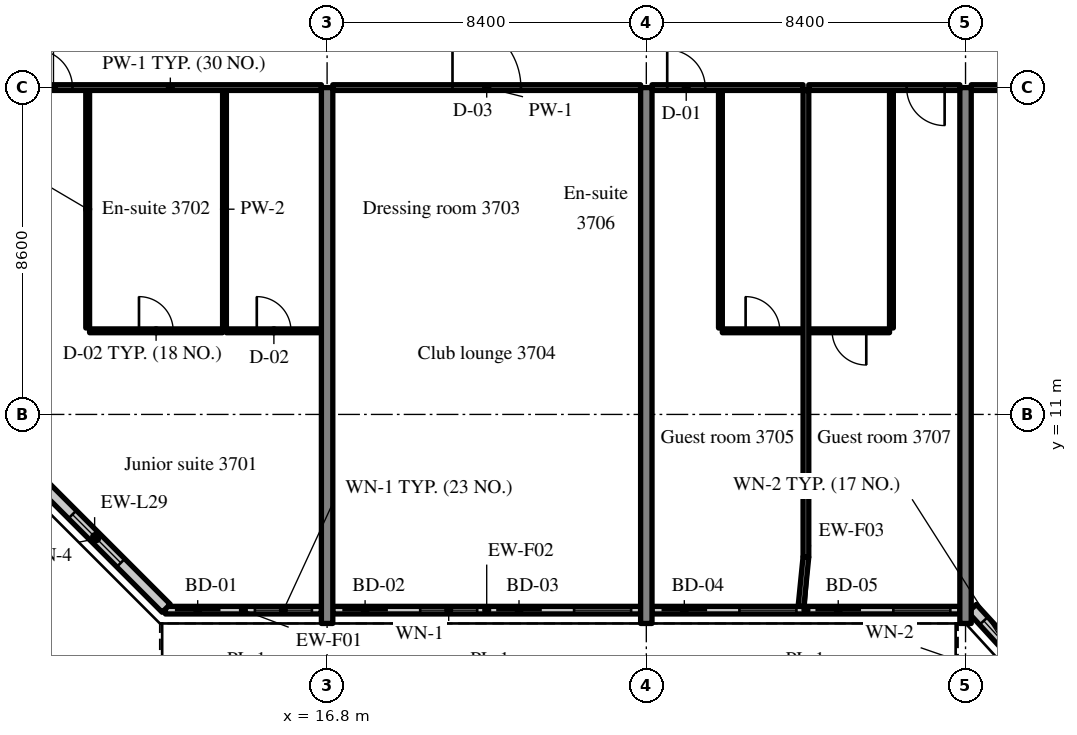
"""IFC4 building model, lengths in metres.
Left out: names, types, materials, properties, quantities, classifications, styles, units other than length and angle.
Written with IfcOpenShell. Run it as: python <this file> out.ifc"""

import sys

from ifc_helpers import new_model, si_unit, direction, frame, frame_2d, origin, place, context, subcontext, project, spatial, rectangle, extrude, source, transform, mapped, element, fill, save


model = new_model("IFC4")
c1 = context("Model", 3, precision=1e-05, world=origin(), true_north=direction((0.0, 1.0)))
c2 = subcontext(c1, "Body", "Model", "MODEL_VIEW")
j1 = project(units=[si_unit("LENGTHUNIT", "METRE"), si_unit("PLANEANGLEUNIT", "RADIAN")], contexts=[c1])
p1 = place(None, origin())
s1 = spatial("IfcSite", under=j1, at=p1, CompositionType="ELEMENT")
p2 = place(p1, origin())
s2 = spatial("IfcBuilding", under=s1, at=p2, CompositionType="ELEMENT")
p3 = place(p2, frame((0.0, 0.0, 155.4)))
s3 = spatial("IfcBuildingStorey", under=s2, at=p3, CompositionType="ELEMENT", Elevation=155.4)
m1 = source(origin(), c2, "Body", "SweptSolid", [
    extrude(rectangle(XDim=14.1, YDim=0.3, at=frame_2d((7.05, 0.0))), origin(), (0.0, 0.0, 1.0), 3.52),
])
for number, where, z_axis, x_axis in (
    (1, (16.8, 5.5, 0.0), (0.0, 0.0, 1.0), (0.0, 1.0, 0.0)),
    (2, (25.2, 5.5, 0.0), (0.0, 0.0, 1.0), (0.0, 1.0, 0.0)),
    (3, (33.6, 5.5, 0.0), (0.0, 0.0, 1.0), (0.0, 1.0, 0.0)),
):
    element("IfcWall", number, at=place(p3, frame(where, z_axis=z_axis, x_axis=x_axis)), inside=s3, PredefinedType="SHEAR", context=c2, shape_type="MappedRepresentation", body=[
        mapped(m1, transform((0.0, 0.0, 0.0), scale=1.0)),
    ])
m2 = source(origin(), c2, "Body", "SweptSolid", [
    extrude(rectangle(XDim=4.105, YDim=0.2, at=frame_2d((2.052, 0.0))), origin(), (0.0, 0.0, 1.0), 2.87),
])
p4 = place(p3, frame((12.545, 5.85, 0.0), z_axis=(0.0, 0.0, 1.0), x_axis=(1.0, 0.0, 0.0)))
e4 = element("IfcWall", 4, at=p4, inside=s3, PredefinedType="SOLIDWALL", context=c2, shape_type="MappedRepresentation", body=[
    mapped(m2, transform((0.0, 0.0, 0.0), scale=1.0)),
])
m3 = source(origin(), c2, "Body", "SweptSolid", [
    extrude(rectangle(XDim=1.2, YDim=2.4, at=frame_2d((0.6, 1.2))), frame((0.0, 0.11, 0.0), z_axis=(0.0, -1.0, 0.0), x_axis=(1.0, 0.0, 0.0)), (0.0, 0.0, 1.0), 0.22),
])
p5 = place(p4, frame((0.25, 0.0, 0.0)))
e5 = element("IfcOpeningElement", 5, at=p5, cuts=e4, PredefinedType="OPENING", context=c2, shape_type="MappedRepresentation", body=[
    mapped(m3, transform((0.0, 0.0, 0.0), scale=1.0)),
])
m4 = source(origin(), c2, "Body", "SweptSolid", [
    extrude(rectangle(XDim=1.5, YDim=1.5, at=frame_2d((0.75, 0.75))), frame((0.0, 0.11, 0.0), z_axis=(0.0, -1.0, 0.0), x_axis=(1.0, 0.0, 0.0)), (0.0, 0.0, 1.0), 0.22),
])
p6 = place(p4, frame((2.355, 0.0, 0.9)))
e6 = element("IfcOpeningElement", 6, at=p6, cuts=e4, PredefinedType="OPENING", context=c2, shape_type="MappedRepresentation", body=[
    mapped(m4, transform((0.0, 0.0, 0.0), scale=1.0)),
])
m5 = source(origin(), c2, "Body", "SweptSolid", [
    extrude(rectangle(XDim=8.1, YDim=0.2, at=frame_2d((4.05, 0.0))), origin(), (0.0, 0.0, 1.0), 2.87),
])
p7 = place(p3, frame((16.95, 5.85, 0.0), z_axis=(0.0, 0.0, 1.0), x_axis=(1.0, 0.0, 0.0)))
e7 = element("IfcWall", 7, at=p7, inside=s3, PredefinedType="SOLIDWALL", context=c2, shape_type="MappedRepresentation", body=[
    mapped(m5, transform((0.0, 0.0, 0.0), scale=1.0)),
])
p8 = place(p7, frame((0.25, 0.0, 0.0)))
e8 = element("IfcOpeningElement", 8, at=p8, cuts=e7, PredefinedType="OPENING", context=c2, shape_type="MappedRepresentation", body=[
    mapped(m3, transform((0.0, 0.0, 0.0), scale=1.0)),
])
p9 = place(p7, frame((2.3, 0.0, 0.9)))
e9 = element("IfcOpeningElement", 9, at=p9, cuts=e7, PredefinedType="OPENING", context=c2, shape_type="MappedRepresentation", body=[
    mapped(m4, transform((0.0, 0.0, 0.0), scale=1.0)),
])
p10 = place(p7, frame((4.3, 0.0, 0.0)))
e10 = element("IfcOpeningElement", 10, at=p10, cuts=e7, PredefinedType="OPENING", context=c2, shape_type="MappedRepresentation", body=[
    mapped(m3, transform((0.0, 0.0, 0.0), scale=1.0)),
])
p11 = place(p7, frame((6.35, 0.0, 0.9)))
e11 = element("IfcOpeningElement", 11, at=p11, cuts=e7, PredefinedType="OPENING", context=c2, shape_type="MappedRepresentation", body=[
    mapped(m4, transform((0.0, 0.0, 0.0), scale=1.0)),
])
m6 = source(origin(), c2, "Body", "SweptSolid", [
    extrude(rectangle(XDim=8.1, YDim=0.2, at=frame_2d((4.05, 0.0))), origin(), (0.0, 0.0, 1.0), 2.87),
])
p12 = place(p3, frame((25.35, 5.85, 0.0), z_axis=(0.0, 0.0, 1.0), x_axis=(1.0, 0.0, 0.0)))
e12 = element("IfcWall", 12, at=p12, inside=s3, PredefinedType="SOLIDWALL", context=c2, shape_type="MappedRepresentation", body=[
    mapped(m6, transform((0.0, 0.0, 0.0), scale=1.0)),
])
p13 = place(p12, frame((0.25, 0.0, 0.0)))
e13 = element("IfcOpeningElement", 13, at=p13, cuts=e12, PredefinedType="OPENING", context=c2, shape_type="MappedRepresentation", body=[
    mapped(m3, transform((0.0, 0.0, 0.0), scale=1.0)),
])
p14 = place(p12, frame((2.3, 0.0, 0.9)))
e14 = element("IfcOpeningElement", 14, at=p14, cuts=e12, PredefinedType="OPENING", context=c2, shape_type="MappedRepresentation", body=[
    mapped(m4, transform((0.0, 0.0, 0.0), scale=1.0)),
])
p15 = place(p12, frame((4.3, 0.0, 0.0)))
e15 = element("IfcOpeningElement", 15, at=p15, cuts=e12, PredefinedType="OPENING", context=c2, shape_type="MappedRepresentation", body=[
    mapped(m3, transform((0.0, 0.0, 0.0), scale=1.0)),
])
p16 = place(p12, frame((6.35, 0.0, 0.9)))
e16 = element("IfcOpeningElement", 16, at=p16, cuts=e12, PredefinedType="OPENING", context=c2, shape_type="MappedRepresentation", body=[
    mapped(m4, transform((0.0, 0.0, 0.0), scale=1.0)),
])
m7 = source(origin(), c2, "Body", "SweptSolid", [
    extrude(rectangle(XDim=2.398, YDim=0.3, at=frame_2d((1.199, 0.0))), origin(), (0.0, 0.0, 1.0), 3.52),
])
p17 = place(p3, frame((33.776, 5.9, 0.0), z_axis=(0.0, 0.0, 1.0), x_axis=(0.675374189419, -0.737475222815, 0.0)))
e17 = element("IfcWall", 17, at=p17, inside=s3, PredefinedType="SOLIDWALL", context=c2, shape_type="MappedRepresentation", body=[
    mapped(m7, transform((0.0, 0.0, 0.0), scale=1.0)),
])
m8 = source(origin(), c2, "Body", "SweptSolid", [
    extrude(rectangle(XDim=1.5, YDim=2.0, at=frame_2d((0.75, 1.0))), frame((0.0, 0.16, 0.0), z_axis=(0.0, -1.0, 0.0), x_axis=(1.0, 0.0, 0.0)), (0.0, 0.0, 1.0), 0.32),
])
p18 = place(p17, frame((0.449, 0.0, 0.9)))
e18 = element("IfcOpeningElement", 18, at=p18, cuts=e17, PredefinedType="OPENING", context=c2, shape_type="MappedRepresentation", body=[
    mapped(m8, transform((0.0, 0.0, 0.0), scale=1.0)),
])
m9 = source(origin(), c2, "Body", "SweptSolid", [
    extrude(rectangle(XDim=5.326, YDim=0.3, at=frame_2d((2.663, 0.0))), origin(), (0.0, 0.0, 1.0), 3.52),
])
p19 = place(p3, frame((8.8, 9.666, 0.0), z_axis=(0.0, 0.0, 1.0), x_axis=(0.707083859269, -0.707129702361, 0.0)))
e19 = element("IfcWall", 19, at=p19, inside=s3, PredefinedType="SOLIDWALL", context=c2, shape_type="MappedRepresentation", body=[
    mapped(m9, transform((0.0, 0.0, 0.0), scale=1.0)),
])
m10 = source(origin(), c2, "Body", "SweptSolid", [
    extrude(rectangle(XDim=1.8, YDim=1.5, at=frame_2d((0.9, 0.75))), frame((0.0, 0.16, 0.0), z_axis=(0.0, -1.0, 0.0), x_axis=(1.0, 0.0, 0.0)), (0.0, 0.0, 1.0), 0.32),
])
p20 = place(p19, frame((1.836, 0.0, 0.9)))
e20 = element("IfcOpeningElement", 20, at=p20, cuts=e19, PredefinedType="OPENING", context=c2, shape_type="MappedRepresentation", body=[
    mapped(m10, transform((0.0, 0.0, 0.0), scale=1.0)),
])
m11 = source(origin(), c2, "Body", "SweptSolid", [
    extrude(rectangle(XDim=6.25, YDim=0.1, at=frame_2d((3.125, 0.0))), origin(), (0.0, 0.0, 1.0), 3.52),
])
for number, where, z_axis, x_axis in (
    (21, (10.5, 13.275, 0.0), (0.0, 0.0, 1.0), (0.0, 1.0, 0.0)),
    (22, (14.1, 13.275, 0.0), (0.0, 0.0, 1.0), (0.0, 1.0, 0.0)),
):
    element("IfcWall", number, at=place(p3, frame(where, z_axis=z_axis, x_axis=x_axis)), inside=s3, PredefinedType="PARTITIONING", context=c2, shape_type="MappedRepresentation", body=[
        mapped(m11, transform((0.0, 0.0, 0.0), scale=1.0)),
    ])
m12 = source(origin(), c2, "Body", "SweptSolid", [
    extrude(rectangle(XDim=3.5, YDim=0.1, at=frame_2d((1.75, 0.0))), origin(), (0.0, 0.0, 1.0), 3.52),
])
p21 = place(p3, frame((10.55, 13.2, 0.0), z_axis=(0.0, 0.0, 1.0), x_axis=(1.0, 0.0, 0.0)))
e23 = element("IfcWall", 23, at=p21, inside=s3, PredefinedType="PARTITIONING", context=c2, shape_type="MappedRepresentation", body=[
    mapped(m12, transform((0.0, 0.0, 0.0), scale=1.0)),
])
m13 = source(origin(), c2, "Body", "SweptSolid", [
    extrude(rectangle(XDim=0.9, YDim=2.1, at=frame_2d((0.45, 1.05))), frame((0.0, 0.06, 0.0), z_axis=(0.0, -1.0, 0.0), x_axis=(1.0, 0.0, 0.0)), (0.0, 0.0, 1.0), 0.12),
])
p22 = place(p21, frame((1.3, 0.0, 0.0)))
e24 = element("IfcOpeningElement", 24, at=p22, cuts=e23, PredefinedType="OPENING", context=c2, shape_type="MappedRepresentation", body=[
    mapped(m13, transform((0.0, 0.0, 0.0), scale=1.0)),
])
m14 = source(origin(), c2, "Body", "SweptSolid", [
    extrude(rectangle(XDim=2.5, YDim=0.1, at=frame_2d((1.25, 0.0))), origin(), (0.0, 0.0, 1.0), 3.52),
])
p23 = place(p3, frame((14.15, 13.2, 0.0), z_axis=(0.0, 0.0, 1.0), x_axis=(1.0, 0.0, 0.0)))
e25 = element("IfcWall", 25, at=p23, inside=s3, PredefinedType="PARTITIONING", context=c2, shape_type="MappedRepresentation", body=[
    mapped(m14, transform((0.0, 0.0, 0.0), scale=1.0)),
])
p24 = place(p23, frame((0.8, 0.0, 0.0)))
e26 = element("IfcOpeningElement", 26, at=p24, cuts=e25, PredefinedType="OPENING", context=c2, shape_type="MappedRepresentation", body=[
    mapped(m13, transform((0.0, 0.0, 0.0), scale=1.0)),
])
m15 = source(origin(), c2, "Body", "SweptSolid", [
    extrude(rectangle(XDim=7.95, YDim=0.15, at=frame_2d((3.975, 0.0))), origin(), (0.0, 0.0, 1.0), 2.82),
])
p25 = place(p3, frame((8.7, 19.6, 0.0), z_axis=(0.0, 0.0, 1.0), x_axis=(1.0, 0.0, 0.0)))
e27 = element("IfcWall", 27, at=p25, inside=s3, PredefinedType="PARTITIONING", context=c2, shape_type="MappedRepresentation", body=[
    mapped(m15, transform((0.0, 0.0, 0.0), scale=1.0)),
])
m16 = source(origin(), c2, "Body", "SweptSolid", [
    extrude(rectangle(XDim=1.0, YDim=2.1, at=frame_2d((0.5, 1.05))), frame((0.0, 0.085, 0.0), z_axis=(0.0, -1.0, 0.0), x_axis=(1.0, 0.0, 0.0)), (0.0, 0.0, 1.0), 0.17),
])
p26 = place(p25, frame((0.4, 0.0, 0.0)))
e28 = element("IfcOpeningElement", 28, at=p26, cuts=e27, PredefinedType="OPENING", context=c2, shape_type="MappedRepresentation", body=[
    mapped(m16, transform((0.0, 0.0, 0.0), scale=1.0)),
])
m17 = source(origin(), c2, "Body", "SweptSolid", [
    extrude(rectangle(XDim=8.1, YDim=0.15, at=frame_2d((4.05, 0.0))), origin(), (0.0, 0.0, 1.0), 2.82),
])
p27 = place(p3, frame((16.95, 19.6, 0.0), z_axis=(0.0, 0.0, 1.0), x_axis=(1.0, 0.0, 0.0)))
e29 = element("IfcWall", 29, at=p27, inside=s3, PredefinedType="PARTITIONING", context=c2, shape_type="MappedRepresentation", body=[
    mapped(m17, transform((0.0, 0.0, 0.0), scale=1.0)),
])
m18 = source(origin(), c2, "Body", "SweptSolid", [
    extrude(rectangle(XDim=1.8, YDim=2.1, at=frame_2d((0.9, 1.05))), frame((0.0, 0.085, 0.0), z_axis=(0.0, -1.0, 0.0), x_axis=(1.0, 0.0, 0.0)), (0.0, 0.0, 1.0), 0.17),
])
p28 = place(p27, frame((3.15, 0.0, 0.0)))
e30 = element("IfcOpeningElement", 30, at=p28, cuts=e29, PredefinedType="OPENING", context=c2, shape_type="MappedRepresentation", body=[
    mapped(m18, transform((0.0, 0.0, 0.0), scale=1.0)),
])
p29 = place(p3, frame((27.15, 13.275, 0.0), z_axis=(0.0, 0.0, 1.0), x_axis=(0.0, 1.0, 0.0)))
e31 = element("IfcWall", 31, at=p29, inside=s3, PredefinedType="PARTITIONING", context=c2, shape_type="MappedRepresentation", body=[
    mapped(m11, transform((0.0, 0.0, 0.0), scale=1.0)),
])
m19 = source(origin(), c2, "Body", "SweptSolid", [
    extrude(rectangle(XDim=2.125, YDim=0.1, at=frame_2d((1.062, 0.0))), origin(), (0.0, 0.0, 1.0), 3.52),
])
p30 = place(p3, frame((27.2, 13.2, 0.0), z_axis=(0.0, 0.0, 1.0), x_axis=(1.0, 0.0, 0.0)))
e32 = element("IfcWall", 32, at=p30, inside=s3, PredefinedType="PARTITIONING", context=c2, shape_type="MappedRepresentation", body=[
    mapped(m19, transform((0.0, 0.0, 0.0), scale=1.0)),
])
p31 = place(p30, frame((0.613, 0.0, 0.0)))
e33 = element("IfcOpeningElement", 33, at=p31, cuts=e32, PredefinedType="OPENING", context=c2, shape_type="MappedRepresentation", body=[
    mapped(m13, transform((0.0, 0.0, 0.0), scale=1.0)),
])
m20 = source(origin(), c2, "Body", "SweptSolid", [
    extrude(rectangle(XDim=3.975, YDim=0.15, at=frame_2d((1.987, 0.0))), origin(), (0.0, 0.0, 1.0), 2.82),
])
p32 = place(p3, frame((25.35, 19.6, 0.0), z_axis=(0.0, 0.0, 1.0), x_axis=(1.0, 0.0, 0.0)))
e34 = element("IfcWall", 34, at=p32, inside=s3, PredefinedType="PARTITIONING", context=c2, shape_type="MappedRepresentation", body=[
    mapped(m20, transform((0.0, 0.0, 0.0), scale=1.0)),
])
p33 = place(p32, frame((0.4, 0.0, 0.0)))
e35 = element("IfcOpeningElement", 35, at=p33, cuts=e34, PredefinedType="OPENING", context=c2, shape_type="MappedRepresentation", body=[
    mapped(m16, transform((0.0, 0.0, 0.0), scale=1.0)),
])
p34 = place(p3, frame((31.65, 13.275, 0.0), z_axis=(0.0, 0.0, 1.0), x_axis=(0.0, 1.0, 0.0)))
e36 = element("IfcWall", 36, at=p34, inside=s3, PredefinedType="PARTITIONING", context=c2, shape_type="MappedRepresentation", body=[
    mapped(m11, transform((0.0, 0.0, 0.0), scale=1.0)),
])
p35 = place(p3, frame((29.475, 13.2, 0.0), z_axis=(0.0, 0.0, 1.0), x_axis=(1.0, 0.0, 0.0)))
e37 = element("IfcWall", 37, at=p35, inside=s3, PredefinedType="PARTITIONING", context=c2, shape_type="MappedRepresentation", body=[
    mapped(m19, transform((0.0, 0.0, 0.0), scale=1.0)),
])
p36 = place(p35, frame((0.613, 0.0, 0.0)))
e38 = element("IfcOpeningElement", 38, at=p36, cuts=e37, PredefinedType="OPENING", context=c2, shape_type="MappedRepresentation", body=[
    mapped(m13, transform((0.0, 0.0, 0.0), scale=1.0)),
])
p37 = place(p3, frame((29.475, 19.6, 0.0), z_axis=(0.0, 0.0, 1.0), x_axis=(1.0, 0.0, 0.0)))
e39 = element("IfcWall", 39, at=p37, inside=s3, PredefinedType="PARTITIONING", context=c2, shape_type="MappedRepresentation", body=[
    mapped(m20, transform((0.0, 0.0, 0.0), scale=1.0)),
])
p38 = place(p37, frame((2.575, 0.0, 0.0)))
e40 = element("IfcOpeningElement", 40, at=p38, cuts=e39, PredefinedType="OPENING", context=c2, shape_type="MappedRepresentation", body=[
    mapped(m16, transform((0.0, 0.0, 0.0), scale=1.0)),
])
m21 = source(origin(), c2, "Body", "SweptSolid", [
    extrude(rectangle(XDim=12.275, YDim=0.15, at=frame_2d((6.137, 0.0))), origin(), (0.0, 0.0, 1.0), 3.52),
])
p39 = place(p3, frame((29.4, 7.25, 0.0), z_axis=(0.0, 0.0, 1.0), x_axis=(0.0, 1.0, 0.0)))
e41 = element("IfcWall", 41, at=p39, inside=s3, PredefinedType="PARTITIONING", context=c2, shape_type="MappedRepresentation", body=[
    mapped(m21, transform((0.0, 0.0, 0.0), scale=1.0)),
])
p40 = place(p3, frame((33.75, 19.6, 0.0), z_axis=(0.0, 0.0, 1.0), x_axis=(1.0, 0.0, 0.0)))
e42 = element("IfcWall", 42, at=p40, inside=s3, PredefinedType="PARTITIONING", context=c2, shape_type="MappedRepresentation", body=[
    mapped(m17, transform((0.0, 0.0, 0.0), scale=1.0)),
])
p41 = place(p40, frame((3.15, 0.0, 0.0)))
e43 = element("IfcOpeningElement", 43, at=p41, cuts=e42, PredefinedType="OPENING", context=c2, shape_type="MappedRepresentation", body=[
    mapped(m18, transform((0.0, 0.0, 0.0), scale=1.0)),
])
m22 = source(origin(), c2, "Body", "SweptSolid", [
    extrude(rectangle(XDim=1.307, YDim=0.15, at=frame_2d((0.653, 0.0))), origin(), (0.0, 0.0, 1.0), 3.52),
])
p42 = place(p3, frame((29.27, 5.95, 0.0), z_axis=(0.0, 0.0, 1.0), x_axis=(0.099411212066, 0.995046436562, 0.0)))
e44 = element("IfcWall", 44, at=p42, inside=s3, PredefinedType="PARTITIONING", context=c2, shape_type="MappedRepresentation", body=[
    mapped(m22, transform((0.0, 0.0, 0.0), scale=1.0)),
])
m23 = source(origin(), c2, "Body", "SweptSolid", [
    extrude(rectangle(XDim=1.2, YDim=2.4, at=frame_2d((0.6, 1.2))), frame((0.0, 0.025, 0.0), z_axis=(0.0, -1.0, 0.0), x_axis=(1.0, 0.0, 0.0)), (0.0, 0.0, 1.0), 0.05),
])
p43 = place(p5, origin())
e45 = element("IfcDoor", 45, at=p43, inside=s3, OperationType="SLIDING_TO_LEFT", PredefinedType="DOOR", context=c2, shape_type="MappedRepresentation", body=[
    mapped(m23, transform((0.0, 0.0, 0.0), scale=1.0)),
])
fill(e5, e45)
m24 = source(origin(), c2, "Body", "SweptSolid", [
    extrude(rectangle(XDim=1.5, YDim=1.5, at=frame_2d((0.75, 0.75))), frame((0.0, 0.03, 0.0), z_axis=(0.0, -1.0, 0.0), x_axis=(1.0, 0.0, 0.0)), (0.0, 0.0, 1.0), 0.06),
])
p44 = place(p6, origin())
e46 = element("IfcWindow", 46, at=p44, inside=s3, PartitioningType="SINGLE_PANEL", PredefinedType="WINDOW", context=c2, shape_type="MappedRepresentation", body=[
    mapped(m24, transform((0.0, 0.0, 0.0), scale=1.0)),
])
fill(e6, e46)
p45 = place(p8, origin())
e47 = element("IfcDoor", 47, at=p45, inside=s3, OperationType="SLIDING_TO_RIGHT", PredefinedType="DOOR", context=c2, shape_type="MappedRepresentation", body=[
    mapped(m23, transform((0.0, 0.0, 0.0), scale=1.0)),
])
fill(e8, e47)
p46 = place(p9, origin())
e48 = element("IfcWindow", 48, at=p46, inside=s3, PartitioningType="SINGLE_PANEL", PredefinedType="WINDOW", context=c2, shape_type="MappedRepresentation", body=[
    mapped(m24, transform((0.0, 0.0, 0.0), scale=1.0)),
])
fill(e9, e48)
p47 = place(p10, origin())
e49 = element("IfcDoor", 49, at=p47, inside=s3, OperationType="SLIDING_TO_LEFT", PredefinedType="DOOR", context=c2, shape_type="MappedRepresentation", body=[
    mapped(m23, transform((0.0, 0.0, 0.0), scale=1.0)),
])
fill(e10, e49)
p48 = place(p11, origin())
e50 = element("IfcWindow", 50, at=p48, inside=s3, PartitioningType="SINGLE_PANEL", PredefinedType="WINDOW", context=c2, shape_type="MappedRepresentation", body=[
    mapped(m24, transform((0.0, 0.0, 0.0), scale=1.0)),
])
fill(e11, e50)
p49 = place(p13, origin())
e51 = element("IfcDoor", 51, at=p49, inside=s3, OperationType="SLIDING_TO_RIGHT", PredefinedType="DOOR", context=c2, shape_type="MappedRepresentation", body=[
    mapped(m23, transform((0.0, 0.0, 0.0), scale=1.0)),
])
fill(e13, e51)
p50 = place(p14, origin())
e52 = element("IfcWindow", 52, at=p50, inside=s3, PartitioningType="SINGLE_PANEL", PredefinedType="WINDOW", context=c2, shape_type="MappedRepresentation", body=[
    mapped(m24, transform((0.0, 0.0, 0.0), scale=1.0)),
])
fill(e14, e52)
p51 = place(p15, origin())
e53 = element("IfcDoor", 53, at=p51, inside=s3, OperationType="SLIDING_TO_LEFT", PredefinedType="DOOR", context=c2, shape_type="MappedRepresentation", body=[
    mapped(m23, transform((0.0, 0.0, 0.0), scale=1.0)),
])
fill(e15, e53)
p52 = place(p16, origin())
e54 = element("IfcWindow", 54, at=p52, inside=s3, PartitioningType="SINGLE_PANEL", PredefinedType="WINDOW", context=c2, shape_type="MappedRepresentation", body=[
    mapped(m24, transform((0.0, 0.0, 0.0), scale=1.0)),
])
fill(e16, e54)
m25 = source(origin(), c2, "Body", "SweptSolid", [
    extrude(rectangle(XDim=1.5, YDim=2.0, at=frame_2d((0.75, 1.0))), frame((0.0, 0.03, 0.0), z_axis=(0.0, -1.0, 0.0), x_axis=(1.0, 0.0, 0.0)), (0.0, 0.0, 1.0), 0.06),
])
p53 = place(p18, origin())
e55 = element("IfcWindow", 55, at=p53, inside=s3, PartitioningType="SINGLE_PANEL", PredefinedType="WINDOW", context=c2, shape_type="MappedRepresentation", body=[
    mapped(m25, transform((0.0, 0.0, 0.0), scale=1.0)),
])
fill(e18, e55)
m26 = source(origin(), c2, "Body", "SweptSolid", [
    extrude(rectangle(XDim=1.8, YDim=1.5, at=frame_2d((0.9, 0.75))), frame((0.0, 0.03, 0.0), z_axis=(0.0, -1.0, 0.0), x_axis=(1.0, 0.0, 0.0)), (0.0, 0.0, 1.0), 0.06),
])
p54 = place(p20, origin())
e56 = element("IfcWindow", 56, at=p54, inside=s3, PartitioningType="SINGLE_PANEL", PredefinedType="WINDOW", context=c2, shape_type="MappedRepresentation", body=[
    mapped(m26, transform((0.0, 0.0, 0.0), scale=1.0)),
])
fill(e20, e56)
m27 = source(origin(), c2, "Body", "SweptSolid", [
    extrude(rectangle(XDim=0.9, YDim=2.1, at=frame_2d((0.45, 1.05))), frame((0.0, 0.025, 0.0), z_axis=(0.0, -1.0, 0.0), x_axis=(1.0, 0.0, 0.0)), (0.0, 0.0, 1.0), 0.05),
])
p55 = place(p22, origin())
e57 = element("IfcDoor", 57, at=p55, inside=s3, OperationType="SINGLE_SWING_LEFT", PredefinedType="DOOR", context=c2, shape_type="MappedRepresentation", body=[
    mapped(m27, transform((0.0, 0.0, 0.0), scale=1.0)),
])
fill(e24, e57)
p56 = place(p24, origin())
e58 = element("IfcDoor", 58, at=p56, inside=s3, OperationType="SINGLE_SWING_LEFT", PredefinedType="DOOR", context=c2, shape_type="MappedRepresentation", body=[
    mapped(m27, transform((0.0, 0.0, 0.0), scale=1.0)),
])
fill(e26, e58)
m28 = source(origin(), c2, "Body", "SweptSolid", [
    extrude(rectangle(XDim=1.0, YDim=2.1, at=frame_2d((0.5, 1.05))), frame((0.0, 0.025, 0.0), z_axis=(0.0, -1.0, 0.0), x_axis=(1.0, 0.0, 0.0)), (0.0, 0.0, 1.0), 0.05),
])
p57 = place(p26, origin())
e59 = element("IfcDoor", 59, at=p57, inside=s3, OperationType="SINGLE_SWING_LEFT", PredefinedType="DOOR", context=c2, shape_type="MappedRepresentation", body=[
    mapped(m28, transform((0.0, 0.0, 0.0), scale=1.0)),
])
fill(e28, e59)
m29 = source(origin(), c2, "Body", "SweptSolid", [
    extrude(rectangle(XDim=1.8, YDim=2.1, at=frame_2d((0.9, 1.05))), frame((0.0, 0.025, 0.0), z_axis=(0.0, -1.0, 0.0), x_axis=(1.0, 0.0, 0.0)), (0.0, 0.0, 1.0), 0.05),
])
p58 = place(p28, origin())
e60 = element("IfcDoor", 60, at=p58, inside=s3, OperationType="DOUBLE_DOOR_SINGLE_SWING", PredefinedType="DOOR", context=c2, shape_type="MappedRepresentation", body=[
    mapped(m29, transform((0.0, 0.0, 0.0), scale=1.0)),
])
fill(e30, e60)
p59 = place(p31, origin())
e61 = element("IfcDoor", 61, at=p59, inside=s3, OperationType="SINGLE_SWING_LEFT", PredefinedType="DOOR", context=c2, shape_type="MappedRepresentation", body=[
    mapped(m27, transform((0.0, 0.0, 0.0), scale=1.0)),
])
fill(e33, e61)
p60 = place(p33, origin())
e62 = element("IfcDoor", 62, at=p60, inside=s3, OperationType="SINGLE_SWING_LEFT", PredefinedType="DOOR", context=c2, shape_type="MappedRepresentation", body=[
    mapped(m28, transform((0.0, 0.0, 0.0), scale=1.0)),
])
fill(e35, e62)
p61 = place(p36, origin())
e63 = element("IfcDoor", 63, at=p61, inside=s3, OperationType="SINGLE_SWING_RIGHT", PredefinedType="DOOR", context=c2, shape_type="MappedRepresentation", body=[
    mapped(m27, transform((0.0, 0.0, 0.0), scale=1.0)),
])
fill(e38, e63)
p62 = place(p38, origin())
e64 = element("IfcDoor", 64, at=p62, inside=s3, OperationType="SINGLE_SWING_RIGHT", PredefinedType="DOOR", context=c2, shape_type="MappedRepresentation", body=[
    mapped(m28, transform((0.0, 0.0, 0.0), scale=1.0)),
])
fill(e40, e64)
save(model, sys.argv[1])
